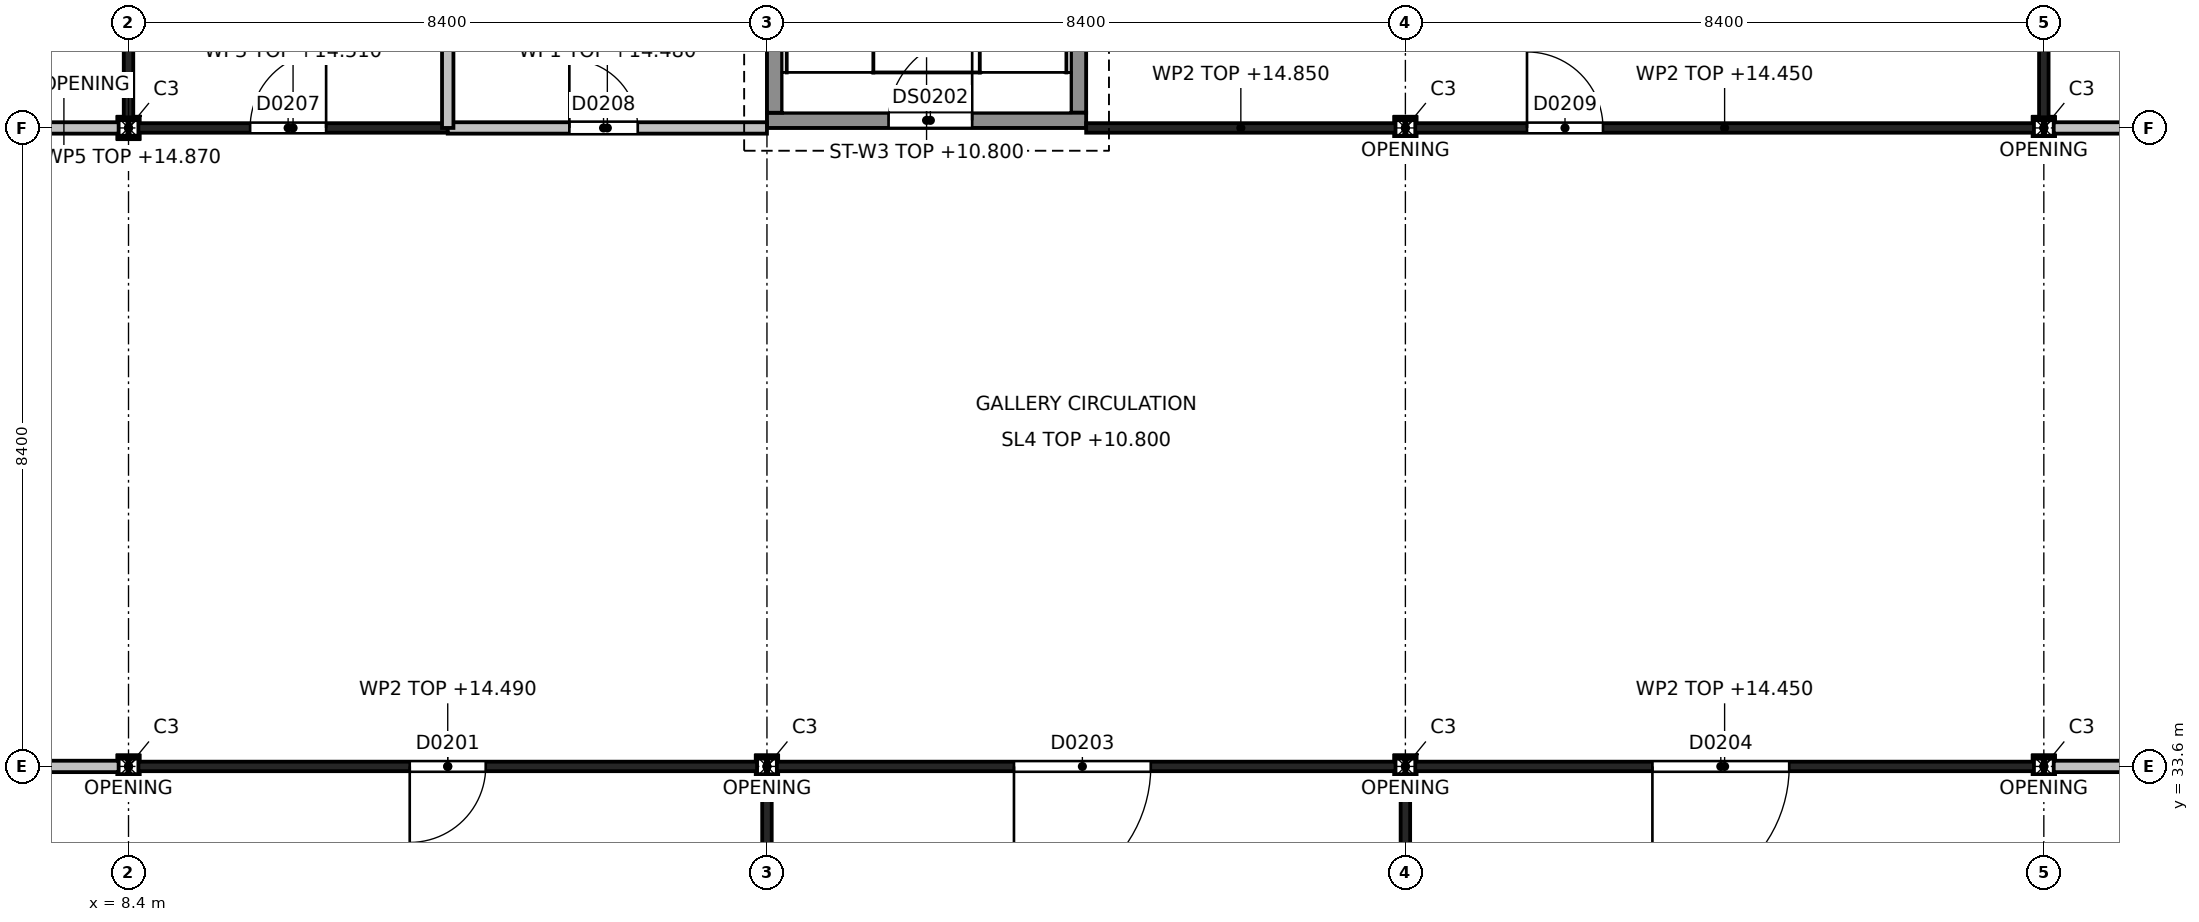
"""IFC4 building model, lengths in metres.
Left out: names, types, materials, properties, quantities, classifications, styles, units other than length and angle.
Written with IfcOpenShell. Run it as: python <this file> out.ifc"""

import sys

from ifc_helpers import new_model, si_unit, direction, frame, frame_2d, origin, origin_2d, place, context, subcontext, project, spatial, rectangle, i_section, extrude, element, fill, save


model = new_model("IFC4")
c1 = context("Model", 3, precision=1e-05, world=origin(), true_north=direction((0.0, 1.0)))
c2 = subcontext(c1, "Body", "Model", "MODEL_VIEW")
j1 = project(units=[si_unit("LENGTHUNIT", "METRE"), si_unit("PLANEANGLEUNIT", "RADIAN")], contexts=[c1])
p1 = place(None, origin())
s1 = spatial("IfcSite", under=j1, at=p1, CompositionType="ELEMENT")
p2 = place(p1, origin())
s2 = spatial("IfcBuilding", under=s1, at=p2, CompositionType="ELEMENT")
p3 = place(p2, frame((0.0, 0.0, 10.8)))
s3 = spatial("IfcBuildingStorey", under=s2, at=p3, CompositionType="ELEMENT", Elevation=10.8)
for number, where, z_axis, x_axis in (
    (1, (8.4, 33.6, 0.0), (0.0, 0.0, 1.0), (1.0, 0.0, 0.0)),
    (2, (8.4, 42.0, 0.0), (0.0, 0.0, 1.0), (1.0, 0.0, 0.0)),
    (3, (16.8, 33.6, 0.0), (0.0, 0.0, 1.0), (1.0, 0.0, 0.0)),
    (4, (25.2, 33.6, 0.0), (0.0, 0.0, 1.0), (1.0, 0.0, 0.0)),
    (5, (25.2, 42.0, 0.0), (0.0, 0.0, 1.0), (1.0, 0.0, 0.0)),
    (6, (33.6, 33.6, 0.0), (0.0, 0.0, 1.0), (1.0, 0.0, 0.0)),
    (7, (33.6, 42.0, 0.0), (0.0, 0.0, 1.0), (1.0, 0.0, 0.0)),
):
    element("IfcColumn", number, at=place(p3, frame(where, z_axis=z_axis, x_axis=x_axis)), inside=s3, PredefinedType="COLUMN", context=c2, shape_type="SweptSolid", body=[
        extrude(i_section(OverallWidth=0.26, OverallDepth=0.26, WebThickness=0.01, FlangeThickness=0.018, at=origin_2d()), origin(), (0.0, 0.0, 1.0), 4.2),
    ])
p4 = place(p3, frame((16.8, 42.1, 0.0), z_axis=(0.0, 0.0, 1.0), x_axis=(1.0, 0.0, 0.0)))
e8 = element("IfcWall", 8, at=p4, inside=s3, PredefinedType="SHEAR", context=c2, shape_type="SweptSolid", body=[
    extrude(rectangle(XDim=4.2, YDim=0.2, at=frame_2d((2.1, 0.0))), origin(), (0.0, 0.0, 1.0), 4.2),
])
p5 = place(p4, frame((1.6, 0.0, 0.0)))
e9 = element("IfcOpeningElement", 9, at=p5, cuts=e8, PredefinedType="OPENING", context=c2, shape_type="SweptSolid", body=[
    extrude(rectangle(XDim=1.1, YDim=2.1, at=frame_2d((0.55, 1.05))), frame((0.0, 0.1, 0.0), z_axis=(0.0, -1.0, 0.0), x_axis=(1.0, 0.0, 0.0)), (0.0, 0.0, 1.0), 0.2),
])
for number, where, z_axis, x_axis in (
    (10, (16.9, 42.2, 0.0), (0.0, 0.0, 1.0), (0.0, 1.0, 0.0)),
    (11, (20.9, 42.2, 0.0), (0.0, 0.0, 1.0), (0.0, 1.0, 0.0)),
):
    element("IfcWall", number, at=place(p3, frame(where, z_axis=z_axis, x_axis=x_axis)), inside=s3, PredefinedType="SHEAR", context=c2, shape_type="SweptSolid", body=[
        extrude(rectangle(XDim=8.0, YDim=0.2, at=frame_2d((4.0, 0.0))), origin(), (0.0, 0.0, 1.0), 4.2),
    ])
p6 = place(p3, frame((16.8, 25.33, 0.0), z_axis=(0.0, 0.0, 1.0), x_axis=(0.0, 1.0, 0.0)))
e12 = element("IfcWall", 12, at=p6, inside=s3, PredefinedType="PARTITIONING", context=c2, shape_type="SweptSolid", body=[
    extrude(rectangle(XDim=8.14, YDim=0.125, at=frame_2d((4.07, 0.0))), origin(), (0.0, 0.0, 1.0), 3.6),
])
p7 = place(p3, frame((0.13, 33.6, 0.0), z_axis=(0.0, 0.0, 1.0), x_axis=(1.0, 0.0, 0.0)))
e13 = element("IfcWall", 13, at=p7, inside=s3, PredefinedType="PARTITIONING", context=c2, shape_type="SweptSolid", body=[
    extrude(rectangle(XDim=8.14, YDim=0.15, at=frame_2d((4.07, 0.0))), origin(), (0.0, 0.0, 1.0), 3.69),
])
p8 = place(p7, frame((0.27, 0.0, 0.0)))
e14 = element("IfcOpeningElement", 14, at=p8, cuts=e13, PredefinedType="OPENING", context=c2, shape_type="SweptSolid", body=[
    extrude(rectangle(XDim=1.0, YDim=2.2, at=frame_2d((0.5, 1.1))), frame((0.0, 0.075, 0.0), z_axis=(0.0, -1.0, 0.0), x_axis=(1.0, 0.0, 0.0)), (0.0, 0.0, 1.0), 0.15),
])
p9 = place(p3, frame((8.53, 33.6, 0.0), z_axis=(0.0, 0.0, 1.0), x_axis=(1.0, 0.0, 0.0)))
e15 = element("IfcWall", 15, at=p9, inside=s3, PredefinedType="PARTITIONING", context=c2, shape_type="SweptSolid", body=[
    extrude(rectangle(XDim=8.14, YDim=0.125, at=frame_2d((4.07, 0.0))), origin(), (0.0, 0.0, 1.0), 3.69),
])
p10 = place(p9, frame((3.57, 0.0, 0.0)))
e16 = element("IfcOpeningElement", 16, at=p10, cuts=e15, PredefinedType="OPENING", context=c2, shape_type="SweptSolid", body=[
    extrude(rectangle(XDim=1.0, YDim=2.2, at=frame_2d((0.5, 1.1))), frame((0.0, 0.062, 0.0), z_axis=(0.0, -1.0, 0.0), x_axis=(1.0, 0.0, 0.0)), (0.0, 0.0, 1.0), 0.125),
])
p11 = place(p3, frame((25.2, 25.33, 0.0), z_axis=(0.0, 0.0, 1.0), x_axis=(0.0, 1.0, 0.0)))
e17 = element("IfcWall", 17, at=p11, inside=s3, PredefinedType="PARTITIONING", context=c2, shape_type="SweptSolid", body=[
    extrude(rectangle(XDim=8.14, YDim=0.125, at=frame_2d((4.07, 0.0))), origin(), (0.0, 0.0, 1.0), 3.6),
])
p12 = place(p3, frame((16.93, 33.6, 0.0), z_axis=(0.0, 0.0, 1.0), x_axis=(1.0, 0.0, 0.0)))
e18 = element("IfcWall", 18, at=p12, inside=s3, PredefinedType="PARTITIONING", context=c2, shape_type="SweptSolid", body=[
    extrude(rectangle(XDim=8.14, YDim=0.125, at=frame_2d((4.07, 0.0))), origin(), (0.0, 0.0, 1.0), 3.69),
])
p13 = place(p12, frame((3.12, 0.0, 0.0)))
e19 = element("IfcOpeningElement", 19, at=p13, cuts=e18, PredefinedType="OPENING", context=c2, shape_type="SweptSolid", body=[
    extrude(rectangle(XDim=1.8, YDim=2.1, at=frame_2d((0.9, 1.05))), frame((0.0, 0.062, 0.0), z_axis=(0.0, -1.0, 0.0), x_axis=(1.0, 0.0, 0.0)), (0.0, 0.0, 1.0), 0.125),
])
p14 = place(p3, frame((25.33, 33.6, 0.0), z_axis=(0.0, 0.0, 1.0), x_axis=(1.0, 0.0, 0.0)))
e20 = element("IfcWall", 20, at=p14, inside=s3, PredefinedType="PARTITIONING", context=c2, shape_type="SweptSolid", body=[
    extrude(rectangle(XDim=8.14, YDim=0.125, at=frame_2d((4.07, 0.0))), origin(), (0.0, 0.0, 1.0), 3.65),
])
p15 = place(p14, frame((3.12, 0.0, 0.0)))
e21 = element("IfcOpeningElement", 21, at=p15, cuts=e20, PredefinedType="OPENING", context=c2, shape_type="SweptSolid", body=[
    extrude(rectangle(XDim=1.8, YDim=2.1, at=frame_2d((0.9, 1.05))), frame((0.0, 0.062, 0.0), z_axis=(0.0, -1.0, 0.0), x_axis=(1.0, 0.0, 0.0)), (0.0, 0.0, 1.0), 0.125),
])
p16 = place(p3, frame((33.73, 33.6, 0.0), z_axis=(0.0, 0.0, 1.0), x_axis=(1.0, 0.0, 0.0)))
e22 = element("IfcWall", 22, at=p16, inside=s3, PredefinedType="PARTITIONING", context=c2, shape_type="SweptSolid", body=[
    extrude(rectangle(XDim=8.14, YDim=0.15, at=frame_2d((4.07, 0.0))), origin(), (0.0, 0.0, 1.0), 3.65),
])
p17 = place(p16, frame((6.12, 0.0, 0.0)))
e23 = element("IfcOpeningElement", 23, at=p17, cuts=e22, PredefinedType="OPENING", context=c2, shape_type="SweptSolid", body=[
    extrude(rectangle(XDim=1.8, YDim=2.1, at=frame_2d((0.9, 1.05))), frame((0.0, 0.075, 0.0), z_axis=(0.0, -1.0, 0.0), x_axis=(1.0, 0.0, 0.0)), (0.0, 0.0, 1.0), 0.15),
])
p18 = place(p3, frame((4.2, 42.0, 0.0), z_axis=(0.0, 0.0, 1.0), x_axis=(1.0, 0.0, 0.0)))
e24 = element("IfcWall", 24, at=p18, inside=s3, PredefinedType="PARTITIONING", context=c2, shape_type="SweptSolid", body=[
    extrude(rectangle(XDim=4.07, YDim=0.15, at=frame_2d((2.035, 0.0))), origin(), (0.0, 0.0, 1.0), 4.07),
])
p19 = place(p18, frame((1.6, 0.0, 0.0)))
e25 = element("IfcOpeningElement", 25, at=p19, cuts=e24, PredefinedType="OPENING", context=c2, shape_type="SweptSolid", body=[
    extrude(rectangle(XDim=0.9, YDim=2.1, at=frame_2d((0.45, 1.05))), frame((0.0, 0.075, 0.0), z_axis=(0.0, -1.0, 0.0), x_axis=(1.0, 0.0, 0.0)), (0.0, 0.0, 1.0), 0.15),
])
p20 = place(p3, frame((8.53, 42.0, 0.0), z_axis=(0.0, 0.0, 1.0), x_axis=(1.0, 0.0, 0.0)))
e26 = element("IfcWall", 26, at=p20, inside=s3, PredefinedType="PARTITIONING", context=c2, shape_type="SweptSolid", body=[
    extrude(rectangle(XDim=4.07, YDim=0.125, at=frame_2d((2.035, 0.0))), origin(), (0.0, 0.0, 1.0), 3.71),
])
p21 = place(p20, frame((1.47, 0.0, 0.0)))
e27 = element("IfcOpeningElement", 27, at=p21, cuts=e26, PredefinedType="OPENING", context=c2, shape_type="SweptSolid", body=[
    extrude(rectangle(XDim=1.0, YDim=2.1, at=frame_2d((0.5, 1.05))), frame((0.0, 0.062, 0.0), z_axis=(0.0, -1.0, 0.0), x_axis=(1.0, 0.0, 0.0)), (0.0, 0.0, 1.0), 0.125),
])
p22 = place(p3, frame((12.6, 42.0, 0.0), z_axis=(0.0, 0.0, 1.0), x_axis=(1.0, 0.0, 0.0)))
e28 = element("IfcWall", 28, at=p22, inside=s3, PredefinedType="PARTITIONING", context=c2, shape_type="SweptSolid", body=[
    extrude(rectangle(XDim=4.2, YDim=0.15, at=frame_2d((2.1, 0.0))), origin(), (0.0, 0.0, 1.0), 3.68),
])
p23 = place(p22, frame((1.6, 0.0, 0.0)))
e29 = element("IfcOpeningElement", 29, at=p23, cuts=e28, PredefinedType="OPENING", context=c2, shape_type="SweptSolid", body=[
    extrude(rectangle(XDim=0.9, YDim=2.1, at=frame_2d((0.45, 1.05))), frame((0.0, 0.075, 0.0), z_axis=(0.0, -1.0, 0.0), x_axis=(1.0, 0.0, 0.0)), (0.0, 0.0, 1.0), 0.15),
])
p24 = place(p3, frame((21.0, 42.0, 0.0), z_axis=(0.0, 0.0, 1.0), x_axis=(1.0, 0.0, 0.0)))
e30 = element("IfcWall", 30, at=p24, inside=s3, PredefinedType="PARTITIONING", context=c2, shape_type="SweptSolid", body=[
    extrude(rectangle(XDim=4.07, YDim=0.125, at=frame_2d((2.035, 0.0))), origin(), (0.0, 0.0, 1.0), 4.05),
])
p25 = place(p3, frame((25.33, 42.0, 0.0), z_axis=(0.0, 0.0, 1.0), x_axis=(1.0, 0.0, 0.0)))
e31 = element("IfcWall", 31, at=p25, inside=s3, PredefinedType="PARTITIONING", context=c2, shape_type="SweptSolid", body=[
    extrude(rectangle(XDim=8.14, YDim=0.125, at=frame_2d((4.07, 0.0))), origin(), (0.0, 0.0, 1.0), 3.65),
])
p26 = place(p25, frame((1.47, 0.0, 0.0)))
e32 = element("IfcOpeningElement", 32, at=p26, cuts=e31, PredefinedType="OPENING", context=c2, shape_type="SweptSolid", body=[
    extrude(rectangle(XDim=1.0, YDim=2.2, at=frame_2d((0.5, 1.1))), frame((0.0, 0.062, 0.0), z_axis=(0.0, -1.0, 0.0), x_axis=(1.0, 0.0, 0.0)), (0.0, 0.0, 1.0), 0.125),
])
p27 = place(p3, frame((33.73, 42.0, 0.0), z_axis=(0.0, 0.0, 1.0), x_axis=(1.0, 0.0, 0.0)))
e33 = element("IfcWall", 33, at=p27, inside=s3, PredefinedType="PARTITIONING", context=c2, shape_type="SweptSolid", body=[
    extrude(rectangle(XDim=4.07, YDim=0.15, at=frame_2d((2.035, 0.0))), origin(), (0.0, 0.0, 1.0), 4.05),
])
p28 = place(p27, frame((1.47, 0.0, 0.0)))
e34 = element("IfcOpeningElement", 34, at=p28, cuts=e33, PredefinedType="OPENING", context=c2, shape_type="SweptSolid", body=[
    extrude(rectangle(XDim=0.9, YDim=2.1, at=frame_2d((0.45, 1.05))), frame((0.0, 0.075, 0.0), z_axis=(0.0, -1.0, 0.0), x_axis=(1.0, 0.0, 0.0)), (0.0, 0.0, 1.0), 0.15),
])
p29 = place(p3, frame((8.4, 42.13, 0.0), z_axis=(0.0, 0.0, 1.0), x_axis=(0.0, 1.0, 0.0)))
e35 = element("IfcWall", 35, at=p29, inside=s3, PredefinedType="PARTITIONING", context=c2, shape_type="SweptSolid", body=[
    extrude(rectangle(XDim=8.14, YDim=0.125, at=frame_2d((4.07, 0.0))), origin(), (0.0, 0.0, 1.0), 3.68),
])
p30 = place(p3, frame((12.6, 42.0, 0.0), z_axis=(0.0, 0.0, 1.0), x_axis=(0.0, 1.0, 0.0)))
e36 = element("IfcWall", 36, at=p30, inside=s3, PredefinedType="PARTITIONING", context=c2, shape_type="SweptSolid", body=[
    extrude(rectangle(XDim=8.159, YDim=0.15, at=frame_2d((4.08, 0.0))), origin(), (0.0, 0.0, 1.0), 3.71),
])
p31 = place(p3, frame((33.6, 42.13, 0.0), z_axis=(0.0, 0.0, 1.0), x_axis=(0.0, 1.0, 0.0)))
e37 = element("IfcWall", 37, at=p31, inside=s3, PredefinedType="PARTITIONING", context=c2, shape_type="SweptSolid", body=[
    extrude(rectangle(XDim=8.14, YDim=0.125, at=frame_2d((4.07, 0.0))), origin(), (0.0, 0.0, 1.0), 3.6),
])
p32 = place(p3, frame((8.4, 42.6, 0.0), z_axis=(0.0, 0.0, 1.0), x_axis=(-1.0, 0.0, 0.0)))
e38 = element("IfcWall", 38, at=p32, inside=s3, PredefinedType="PARTITIONING", context=c2, shape_type="SweptSolid", body=[
    extrude(rectangle(XDim=1.7, YDim=0.05, at=frame_2d((0.85, 0.0))), origin(), (0.0, 0.0, 1.0), 4.07),
])
p33 = place(p10, origin())
e39 = element("IfcDoor", 39, at=p33, inside=s3, OperationType="SINGLE_SWING_LEFT", PredefinedType="DOOR", context=c2, shape_type="SweptSolid", body=[
    extrude(rectangle(XDim=1.0, YDim=2.2, at=frame_2d((0.5, 1.1))), frame((0.0, 0.025, 0.0), z_axis=(0.0, -1.0, 0.0), x_axis=(1.0, 0.0, 0.0)), (0.0, 0.0, 1.0), 0.05),
])
fill(e16, e39)
p34 = place(p13, origin())
e40 = element("IfcDoor", 40, at=p34, inside=s3, OperationType="DOUBLE_DOOR_DOUBLE_SWING", PredefinedType="DOOR", context=c2, shape_type="SweptSolid", body=[
    extrude(rectangle(XDim=1.8, YDim=2.1, at=frame_2d((0.9, 1.05))), frame((0.0, 0.025, 0.0), z_axis=(0.0, -1.0, 0.0), x_axis=(1.0, 0.0, 0.0)), (0.0, 0.0, 1.0), 0.05),
])
fill(e19, e40)
p35 = place(p15, origin())
e41 = element("IfcDoor", 41, at=p35, inside=s3, OperationType="DOUBLE_DOOR_DOUBLE_SWING", PredefinedType="DOOR", context=c2, shape_type="SweptSolid", body=[
    extrude(rectangle(XDim=1.8, YDim=2.1, at=frame_2d((0.9, 1.05))), frame((0.0, 0.025, 0.0), z_axis=(0.0, -1.0, 0.0), x_axis=(1.0, 0.0, 0.0)), (0.0, 0.0, 1.0), 0.05),
])
fill(e21, e41)
p36 = place(p21, origin())
e42 = element("IfcDoor", 42, at=p36, inside=s3, OperationType="SINGLE_SWING_RIGHT", PredefinedType="DOOR", context=c2, shape_type="SweptSolid", body=[
    extrude(rectangle(XDim=1.0, YDim=2.1, at=frame_2d((0.5, 1.05))), frame((0.0, 0.025, 0.0), z_axis=(0.0, -1.0, 0.0), x_axis=(1.0, 0.0, 0.0)), (0.0, 0.0, 1.0), 0.05),
])
fill(e27, e42)
p37 = place(p23, origin())
e43 = element("IfcDoor", 43, at=p37, inside=s3, OperationType="SINGLE_SWING_LEFT", PredefinedType="DOOR", context=c2, shape_type="SweptSolid", body=[
    extrude(rectangle(XDim=0.9, YDim=2.1, at=frame_2d((0.45, 1.05))), frame((0.0, 0.025, 0.0), z_axis=(0.0, -1.0, 0.0), x_axis=(1.0, 0.0, 0.0)), (0.0, 0.0, 1.0), 0.05),
])
fill(e29, e43)
p38 = place(p26, origin())
e44 = element("IfcDoor", 44, at=p38, inside=s3, OperationType="SINGLE_SWING_LEFT", PredefinedType="DOOR", context=c2, shape_type="SweptSolid", body=[
    extrude(rectangle(XDim=1.0, YDim=2.2, at=frame_2d((0.5, 1.1))), frame((0.0, 0.025, 0.0), z_axis=(0.0, -1.0, 0.0), x_axis=(1.0, 0.0, 0.0)), (0.0, 0.0, 1.0), 0.05),
])
fill(e32, e44)
p39 = place(p5, origin())
e45 = element("IfcDoor", 45, at=p39, inside=s3, OperationType="SINGLE_SWING_RIGHT", PredefinedType="DOOR", context=c2, shape_type="SweptSolid", body=[
    extrude(rectangle(XDim=1.1, YDim=2.1, at=frame_2d((0.55, 1.05))), frame((0.0, 0.025, 0.0), z_axis=(0.0, -1.0, 0.0), x_axis=(1.0, 0.0, 0.0)), (0.0, 0.0, 1.0), 0.05),
])
fill(e9, e45)
save(model, sys.argv[1])
